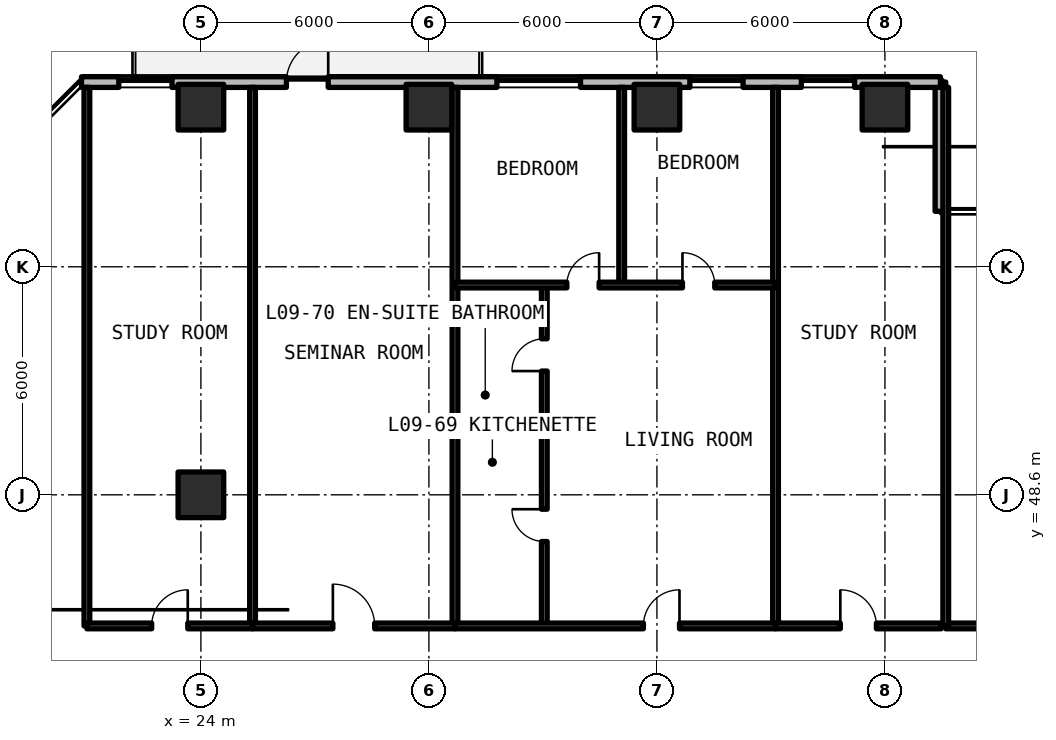
"""IFC4 building model, lengths in metres.
Left out: names, types, materials, properties, quantities, classifications, styles, units other than length and angle.
Written with IfcOpenShell. Run it as: python <this file> out.ifc"""

import sys

from ifc_helpers import new_model, si_unit, direction, frame, frame_2d, origin, origin_2d, place, context, subcontext, project, spatial, rectangle, extrude, element, fill, save


model = new_model("IFC4")
c1 = context("Model", 3, precision=1e-05, world=origin(), true_north=direction((0.0, 1.0)))
c2 = subcontext(c1, "Body", "Model", "MODEL_VIEW")
j1 = project(units=[si_unit("LENGTHUNIT", "METRE"), si_unit("PLANEANGLEUNIT", "RADIAN")], contexts=[c1])
p1 = place(None, origin())
s1 = spatial("IfcSite", under=j1, at=p1, CompositionType="ELEMENT")
p2 = place(p1, origin())
s2 = spatial("IfcBuilding", under=s1, at=p2, CompositionType="ELEMENT")
p3 = place(p2, frame((0.0, 0.0, 35.64)))
s3 = spatial("IfcBuildingStorey", under=s2, at=p3, CompositionType="ELEMENT", Elevation=35.64)
for number, where, z_axis, x_axis in (
    (1, (24.0, 48.6, 0.0), (0.0, 0.0, 1.0), (1.0, 0.0, 0.0)),
    (2, (24.0, 58.8, 0.0), (0.0, 0.0, 1.0), (1.0, 0.0, 0.0)),
    (3, (30.0, 58.8, 0.0), (0.0, 0.0, 1.0), (1.0, 0.0, 0.0)),
    (4, (36.0, 58.8, 0.0), (0.0, 0.0, 1.0), (1.0, 0.0, 0.0)),
    (5, (42.0, 58.8, 0.0), (0.0, 0.0, 1.0), (1.0, 0.0, 0.0)),
):
    element("IfcColumn", number, at=place(p3, frame(where, z_axis=z_axis, x_axis=x_axis)), inside=s3, PredefinedType="COLUMN", context=c2, shape_type="SweptSolid", body=[
        extrude(rectangle(XDim=1.2, YDim=1.2, at=origin_2d()), origin(), (0.0, 0.0, 1.0), 3.3),
    ])
p4 = place(p3, frame((43.46, 56.06, 0.0), z_axis=(0.0, 0.0, 1.0), x_axis=(0.0, 1.0, 0.0)))
e6 = element("IfcWall", 6, at=p4, inside=s3, PredefinedType="SOLIDWALL", context=c2, shape_type="SweptSolid", body=[
    extrude(rectangle(XDim=3.4, YDim=0.28, at=frame_2d((1.7, 0.0))), origin(), (0.0, 0.0, 1.0), 3.08),
])
p5 = place(p3, frame((43.46, 59.46, 0.0), z_axis=(0.0, 0.0, 1.0), x_axis=(-1.0, 0.0, 0.0)))
e7 = element("IfcWall", 7, at=p5, inside=s3, PredefinedType="SOLIDWALL", context=c2, shape_type="SweptSolid", body=[
    extrude(rectangle(XDim=22.602, YDim=0.28, at=frame_2d((11.301, 0.0))), origin(), (0.0, 0.0, 1.0), 3.08),
])
p6 = place(p5, frame((16.11, 0.0, 0.0)))
e8 = element("IfcOpeningElement", 8, at=p6, cuts=e7, PredefinedType="OPENING", context=c2, shape_type="SweptSolid", body=[
    extrude(rectangle(XDim=1.1, YDim=2.15, at=frame_2d((0.55, 1.075))), frame((0.0, 0.15, 0.0), z_axis=(0.0, -1.0, 0.0), x_axis=(1.0, 0.0, 0.0)), (0.0, 0.0, 1.0), 0.3),
])
p7 = place(p5, frame((20.221, 0.0, 0.78)))
e9 = element("IfcOpeningElement", 9, at=p7, cuts=e7, PredefinedType="OPENING", context=c2, shape_type="SweptSolid", body=[
    extrude(rectangle(XDim=1.4, YDim=1.65, at=frame_2d((0.7, 0.825))), frame((0.0, 0.15, 0.0), z_axis=(0.0, -1.0, 0.0), x_axis=(1.0, 0.0, 0.0)), (0.0, 0.0, 1.0), 0.3),
])
p8 = place(p5, frame((9.471, 0.0, 0.78)))
e10 = element("IfcOpeningElement", 10, at=p8, cuts=e7, PredefinedType="OPENING", context=c2, shape_type="SweptSolid", body=[
    extrude(rectangle(XDim=2.2, YDim=1.66, at=frame_2d((1.1, 0.83))), frame((0.0, 0.15, 0.0), z_axis=(0.0, -1.0, 0.0), x_axis=(1.0, 0.0, 0.0)), (0.0, 0.0, 1.0), 0.3),
])
p9 = place(p5, frame((5.193, 0.0, 0.78)))
e11 = element("IfcOpeningElement", 11, at=p9, cuts=e7, PredefinedType="OPENING", context=c2, shape_type="SweptSolid", body=[
    extrude(rectangle(XDim=1.4, YDim=1.65, at=frame_2d((0.7, 0.825))), frame((0.0, 0.15, 0.0), z_axis=(0.0, -1.0, 0.0), x_axis=(1.0, 0.0, 0.0)), (0.0, 0.0, 1.0), 0.3),
])
p10 = place(p5, frame((2.26, 0.0, 0.78)))
e12 = element("IfcOpeningElement", 12, at=p10, cuts=e7, PredefinedType="OPENING", context=c2, shape_type="SweptSolid", body=[
    extrude(rectangle(XDim=1.4, YDim=1.65, at=frame_2d((0.7, 0.825))), frame((0.0, 0.15, 0.0), z_axis=(0.0, -1.0, 0.0), x_axis=(1.0, 0.0, 0.0)), (0.0, 0.0, 1.0), 0.3),
])
p11 = place(p3, frame((43.6, 45.15, 0.0), z_axis=(0.0, 0.0, 1.0), x_axis=(1.0, 0.0, 0.0)))
e13 = element("IfcWall", 13, at=p11, inside=s3, PredefinedType="SOLIDWALL", context=c2, shape_type="SweptSolid", body=[
    extrude(rectangle(XDim=8.4, YDim=0.15, at=frame_2d((4.2, 0.0))), origin(), (0.0, 0.0, 1.0), 2.35),
])
p12 = place(p11, frame((3.65, 0.0, 0.0)))
e14 = element("IfcOpeningElement", 14, at=p12, cuts=e13, PredefinedType="OPENING", context=c2, shape_type="SweptSolid", body=[
    extrude(rectangle(XDim=1.1, YDim=2.15, at=frame_2d((0.55, 1.075))), frame((0.0, 0.085, 0.0), z_axis=(0.0, -1.0, 0.0), x_axis=(1.0, 0.0, 0.0)), (0.0, 0.0, 1.0), 0.17),
])
for number, where, z_axis, x_axis in (
    (15, (43.6, 45.15, 0.0), (0.0, 0.0, 1.0), (0.0, 1.0, 0.0)),
    (16, (21.0, 45.15, 0.0), (0.0, 0.0, 1.0), (0.0, 1.0, 0.0)),
    (17, (25.359, 45.15, 0.0), (0.0, 0.0, 1.0), (0.0, 1.0, 0.0)),
):
    element("IfcWall", number, at=place(p3, frame(where, z_axis=z_axis, x_axis=x_axis)), inside=s3, PredefinedType="SOLIDWALL", context=c2, shape_type="SweptSolid", body=[
        extrude(rectangle(XDim=14.17, YDim=0.15, at=frame_2d((7.085, 0.0))), origin(), (0.0, 0.0, 1.0), 2.35),
    ])
p13 = place(p3, frame((21.0, 45.15, 0.0), z_axis=(0.0, 0.0, 1.0), x_axis=(1.0, 0.0, 0.0)))
e18 = element("IfcWall", 18, at=p13, inside=s3, PredefinedType="SOLIDWALL", context=c2, shape_type="SweptSolid", body=[
    extrude(rectangle(XDim=4.359, YDim=0.15, at=frame_2d((2.179, 0.0))), origin(), (0.0, 0.0, 1.0), 2.35),
])
p14 = place(p13, frame((1.704, 0.0, 0.0)))
e19 = element("IfcOpeningElement", 19, at=p14, cuts=e18, PredefinedType="OPENING", context=c2, shape_type="SweptSolid", body=[
    extrude(rectangle(XDim=0.95, YDim=2.15, at=frame_2d((0.475, 1.075))), frame((0.0, 0.085, 0.0), z_axis=(0.0, -1.0, 0.0), x_axis=(1.0, 0.0, 0.0)), (0.0, 0.0, 1.0), 0.17),
])
p15 = place(p3, frame((30.686, 45.15, 0.0), z_axis=(0.0, 0.0, 1.0), x_axis=(0.0, 1.0, 0.0)))
e20 = element("IfcWall", 20, at=p15, inside=s3, PredefinedType="SOLIDWALL", context=c2, shape_type="SweptSolid", body=[
    extrude(rectangle(XDim=14.17, YDim=0.15, at=frame_2d((7.085, 0.0))), origin(), (0.0, 0.0, 1.0), 2.35),
])
p16 = place(p3, frame((25.359, 45.15, 0.0), z_axis=(0.0, 0.0, 1.0), x_axis=(1.0, 0.0, 0.0)))
e21 = element("IfcWall", 21, at=p16, inside=s3, PredefinedType="SOLIDWALL", context=c2, shape_type="SweptSolid", body=[
    extrude(rectangle(XDim=5.327, YDim=0.15, at=frame_2d((2.664, 0.0))), origin(), (0.0, 0.0, 1.0), 2.35),
])
p17 = place(p16, frame((2.114, 0.0, 0.0)))
e22 = element("IfcOpeningElement", 22, at=p17, cuts=e21, PredefinedType="OPENING", context=c2, shape_type="SweptSolid", body=[
    extrude(rectangle(XDim=1.1, YDim=2.15, at=frame_2d((0.55, 1.075))), frame((0.0, 0.085, 0.0), z_axis=(0.0, -1.0, 0.0), x_axis=(1.0, 0.0, 0.0)), (0.0, 0.0, 1.0), 0.17),
])
p18 = place(p3, frame((39.121, 45.15, 0.0), z_axis=(0.0, 0.0, 1.0), x_axis=(0.0, 1.0, 0.0)))
e23 = element("IfcWall", 23, at=p18, inside=s3, PredefinedType="SOLIDWALL", context=c2, shape_type="SweptSolid", body=[
    extrude(rectangle(XDim=14.17, YDim=0.15, at=frame_2d((7.085, 0.0))), origin(), (0.0, 0.0, 1.0), 2.35),
])
p19 = place(p3, frame((30.686, 50.442, 0.0), z_axis=(0.0, 0.0, 1.0), x_axis=(1.0, 0.0, 0.0)))
e24 = element("IfcWall", 24, at=p19, inside=s3, PredefinedType="PARTITIONING", context=c2, shape_type="SweptSolid", body=[
    extrude(rectangle(XDim=2.35, YDim=0.15, at=frame_2d((1.175, 0.0))), origin(), (0.0, 0.0, 1.0), 2.35),
])
p20 = place(p3, frame((33.036, 45.15, 0.0), z_axis=(0.0, 0.0, 1.0), x_axis=(0.0, 1.0, 0.0)))
e25 = element("IfcWall", 25, at=p20, inside=s3, PredefinedType="PARTITIONING", context=c2, shape_type="SweptSolid", body=[
    extrude(rectangle(XDim=8.97, YDim=0.15, at=frame_2d((4.485, 0.0))), origin(), (0.0, 0.0, 1.0), 2.35),
])
p21 = place(p20, frame((2.221, 0.0, 0.0)))
e26 = element("IfcOpeningElement", 26, at=p21, cuts=e25, PredefinedType="OPENING", context=c2, shape_type="SweptSolid", body=[
    extrude(rectangle(XDim=0.85, YDim=2.1, at=frame_2d((0.425, 1.05))), frame((0.0, 0.085, 0.0), z_axis=(0.0, -1.0, 0.0), x_axis=(1.0, 0.0, 0.0)), (0.0, 0.0, 1.0), 0.17),
])
p22 = place(p20, frame((6.706, 0.0, 0.0)))
e27 = element("IfcOpeningElement", 27, at=p22, cuts=e25, PredefinedType="OPENING", context=c2, shape_type="SweptSolid", body=[
    extrude(rectangle(XDim=0.85, YDim=2.1, at=frame_2d((0.425, 1.05))), frame((0.0, 0.085, 0.0), z_axis=(0.0, -1.0, 0.0), x_axis=(1.0, 0.0, 0.0)), (0.0, 0.0, 1.0), 0.17),
])
p23 = place(p3, frame((35.073, 54.12, 0.0), z_axis=(0.0, 0.0, 1.0), x_axis=(0.0, 1.0, 0.0)))
e28 = element("IfcWall", 28, at=p23, inside=s3, PredefinedType="PARTITIONING", context=c2, shape_type="SweptSolid", body=[
    extrude(rectangle(XDim=5.2, YDim=0.15, at=frame_2d((2.6, 0.0))), origin(), (0.0, 0.0, 1.0), 2.35),
])
p24 = place(p3, frame((30.686, 54.12, 0.0), z_axis=(0.0, 0.0, 1.0), x_axis=(1.0, 0.0, 0.0)))
e29 = element("IfcWall", 29, at=p24, inside=s3, PredefinedType="PARTITIONING", context=c2, shape_type="SweptSolid", body=[
    extrude(rectangle(XDim=8.435, YDim=0.15, at=frame_2d((4.217, 0.0))), origin(), (0.0, 0.0, 1.0), 2.35),
])
p25 = place(p24, frame((2.943, 0.0, 0.0)))
e30 = element("IfcOpeningElement", 30, at=p25, cuts=e29, PredefinedType="OPENING", context=c2, shape_type="SweptSolid", body=[
    extrude(rectangle(XDim=0.85, YDim=2.1, at=frame_2d((0.425, 1.05))), frame((0.0, 0.085, 0.0), z_axis=(0.0, -1.0, 0.0), x_axis=(1.0, 0.0, 0.0)), (0.0, 0.0, 1.0), 0.17),
])
p26 = place(p24, frame((5.986, 0.0, 0.0)))
e31 = element("IfcOpeningElement", 31, at=p26, cuts=e29, PredefinedType="OPENING", context=c2, shape_type="SweptSolid", body=[
    extrude(rectangle(XDim=0.85, YDim=2.1, at=frame_2d((0.425, 1.05))), frame((0.0, 0.085, 0.0), z_axis=(0.0, -1.0, 0.0), x_axis=(1.0, 0.0, 0.0)), (0.0, 0.0, 1.0), 0.17),
])
p27 = place(p3, frame((30.686, 45.15, 0.0), z_axis=(0.0, 0.0, 1.0), x_axis=(1.0, 0.0, 0.0)))
e32 = element("IfcWall", 32, at=p27, inside=s3, PredefinedType="SOLIDWALL", context=c2, shape_type="SweptSolid", body=[
    extrude(rectangle(XDim=8.435, YDim=0.15, at=frame_2d((4.217, 0.0))), origin(), (0.0, 0.0, 1.0), 2.35),
])
p28 = place(p27, frame((4.958, 0.0, 0.0)))
e33 = element("IfcOpeningElement", 33, at=p28, cuts=e32, PredefinedType="OPENING", context=c2, shape_type="SweptSolid", body=[
    extrude(rectangle(XDim=0.95, YDim=2.15, at=frame_2d((0.475, 1.075))), frame((0.0, 0.085, 0.0), z_axis=(0.0, -1.0, 0.0), x_axis=(1.0, 0.0, 0.0)), (0.0, 0.0, 1.0), 0.17),
])
p29 = place(p3, frame((39.121, 45.15, 0.0), z_axis=(0.0, 0.0, 1.0), x_axis=(1.0, 0.0, 0.0)))
e34 = element("IfcWall", 34, at=p29, inside=s3, PredefinedType="SOLIDWALL", context=c2, shape_type="SweptSolid", body=[
    extrude(rectangle(XDim=4.359, YDim=0.15, at=frame_2d((2.179, 0.0))), origin(), (0.0, 0.0, 1.0), 2.35),
])
p30 = place(p29, frame((1.704, 0.0, 0.0)))
e35 = element("IfcOpeningElement", 35, at=p30, cuts=e34, PredefinedType="OPENING", context=c2, shape_type="SweptSolid", body=[
    extrude(rectangle(XDim=0.95, YDim=2.15, at=frame_2d((0.475, 1.075))), frame((0.0, 0.085, 0.0), z_axis=(0.0, -1.0, 0.0), x_axis=(1.0, 0.0, 0.0)), (0.0, 0.0, 1.0), 0.17),
])
p31 = place(p6, frame((1.1, 0.0, 0.0), z_axis=(0.0, 0.0, 1.0), x_axis=(-1.0, 0.0, 0.0)))
e36 = element("IfcDoor", 36, at=p31, inside=s3, OperationType="SINGLE_SWING_RIGHT", PredefinedType="DOOR", context=c2, shape_type="SweptSolid", body=[
    extrude(rectangle(XDim=1.1, YDim=2.15, at=frame_2d((0.55, 1.075))), frame((0.0, 0.025, 0.0), z_axis=(0.0, -1.0, 0.0), x_axis=(1.0, 0.0, 0.0)), (0.0, 0.0, 1.0), 0.05),
])
fill(e8, e36)
p32 = place(p7, origin())
e37 = element("IfcWindow", 37, at=p32, inside=s3, PartitioningType="SINGLE_PANEL", PredefinedType="WINDOW", context=c2, shape_type="SweptSolid", body=[
    extrude(rectangle(XDim=1.4, YDim=1.65, at=frame_2d((0.7, 0.825))), frame((0.0, 0.03, 0.0), z_axis=(0.0, -1.0, 0.0), x_axis=(1.0, 0.0, 0.0)), (0.0, 0.0, 1.0), 0.06),
])
fill(e9, e37)
p33 = place(p8, origin())
e38 = element("IfcWindow", 38, at=p33, inside=s3, PartitioningType="SINGLE_PANEL", PredefinedType="WINDOW", context=c2, shape_type="SweptSolid", body=[
    extrude(rectangle(XDim=2.2, YDim=1.66, at=frame_2d((1.1, 0.83))), frame((0.0, 0.03, 0.0), z_axis=(0.0, -1.0, 0.0), x_axis=(1.0, 0.0, 0.0)), (0.0, 0.0, 1.0), 0.06),
])
fill(e10, e38)
p34 = place(p9, origin())
e39 = element("IfcWindow", 39, at=p34, inside=s3, PartitioningType="SINGLE_PANEL", PredefinedType="WINDOW", context=c2, shape_type="SweptSolid", body=[
    extrude(rectangle(XDim=1.4, YDim=1.65, at=frame_2d((0.7, 0.825))), frame((0.0, 0.03, 0.0), z_axis=(0.0, -1.0, 0.0), x_axis=(1.0, 0.0, 0.0)), (0.0, 0.0, 1.0), 0.06),
])
fill(e11, e39)
p35 = place(p10, origin())
e40 = element("IfcWindow", 40, at=p35, inside=s3, PartitioningType="SINGLE_PANEL", PredefinedType="WINDOW", context=c2, shape_type="SweptSolid", body=[
    extrude(rectangle(XDim=1.4, YDim=1.65, at=frame_2d((0.7, 0.825))), frame((0.0, 0.03, 0.0), z_axis=(0.0, -1.0, 0.0), x_axis=(1.0, 0.0, 0.0)), (0.0, 0.0, 1.0), 0.06),
])
fill(e12, e40)
p36 = place(p14, origin())
e41 = element("IfcDoor", 41, at=p36, inside=s3, OperationType="SINGLE_SWING_RIGHT", PredefinedType="DOOR", context=c2, shape_type="SweptSolid", body=[
    extrude(rectangle(XDim=0.95, YDim=2.15, at=frame_2d((0.475, 1.075))), frame((0.0, 0.025, 0.0), z_axis=(0.0, -1.0, 0.0), x_axis=(1.0, 0.0, 0.0)), (0.0, 0.0, 1.0), 0.05),
])
fill(e19, e41)
p37 = place(p17, origin())
e42 = element("IfcDoor", 42, at=p37, inside=s3, OperationType="SINGLE_SWING_LEFT", PredefinedType="DOOR", context=c2, shape_type="SweptSolid", body=[
    extrude(rectangle(XDim=1.1, YDim=2.15, at=frame_2d((0.55, 1.075))), frame((0.0, 0.025, 0.0), z_axis=(0.0, -1.0, 0.0), x_axis=(1.0, 0.0, 0.0)), (0.0, 0.0, 1.0), 0.05),
])
fill(e22, e42)
p38 = place(p21, origin())
e43 = element("IfcDoor", 43, at=p38, inside=s3, OperationType="SINGLE_SWING_RIGHT", PredefinedType="DOOR", context=c2, shape_type="SweptSolid", body=[
    extrude(rectangle(XDim=0.85, YDim=2.1, at=frame_2d((0.425, 1.05))), frame((0.0, 0.025, 0.0), z_axis=(0.0, -1.0, 0.0), x_axis=(1.0, 0.0, 0.0)), (0.0, 0.0, 1.0), 0.05),
])
fill(e26, e43)
p39 = place(p22, origin())
e44 = element("IfcDoor", 44, at=p39, inside=s3, OperationType="SINGLE_SWING_LEFT", PredefinedType="DOOR", context=c2, shape_type="SweptSolid", body=[
    extrude(rectangle(XDim=0.85, YDim=2.1, at=frame_2d((0.425, 1.05))), frame((0.0, 0.025, 0.0), z_axis=(0.0, -1.0, 0.0), x_axis=(1.0, 0.0, 0.0)), (0.0, 0.0, 1.0), 0.05),
])
fill(e27, e44)
p40 = place(p25, origin())
e45 = element("IfcDoor", 45, at=p40, inside=s3, OperationType="SINGLE_SWING_RIGHT", PredefinedType="DOOR", context=c2, shape_type="SweptSolid", body=[
    extrude(rectangle(XDim=0.85, YDim=2.1, at=frame_2d((0.425, 1.05))), frame((0.0, 0.025, 0.0), z_axis=(0.0, -1.0, 0.0), x_axis=(1.0, 0.0, 0.0)), (0.0, 0.0, 1.0), 0.05),
])
fill(e30, e45)
p41 = place(p26, origin())
e46 = element("IfcDoor", 46, at=p41, inside=s3, OperationType="SINGLE_SWING_LEFT", PredefinedType="DOOR", context=c2, shape_type="SweptSolid", body=[
    extrude(rectangle(XDim=0.85, YDim=2.1, at=frame_2d((0.425, 1.05))), frame((0.0, 0.025, 0.0), z_axis=(0.0, -1.0, 0.0), x_axis=(1.0, 0.0, 0.0)), (0.0, 0.0, 1.0), 0.05),
])
fill(e31, e46)
p42 = place(p28, origin())
e47 = element("IfcDoor", 47, at=p42, inside=s3, OperationType="SINGLE_SWING_RIGHT", PredefinedType="DOOR", context=c2, shape_type="SweptSolid", body=[
    extrude(rectangle(XDim=0.95, YDim=2.15, at=frame_2d((0.475, 1.075))), frame((0.0, 0.025, 0.0), z_axis=(0.0, -1.0, 0.0), x_axis=(1.0, 0.0, 0.0)), (0.0, 0.0, 1.0), 0.05),
])
fill(e33, e47)
p43 = place(p30, origin())
e48 = element("IfcDoor", 48, at=p43, inside=s3, OperationType="SINGLE_SWING_LEFT", PredefinedType="DOOR", context=c2, shape_type="SweptSolid", body=[
    extrude(rectangle(XDim=0.95, YDim=2.15, at=frame_2d((0.475, 1.075))), frame((0.0, 0.025, 0.0), z_axis=(0.0, -1.0, 0.0), x_axis=(1.0, 0.0, 0.0)), (0.0, 0.0, 1.0), 0.05),
])
fill(e35, e48)
save(model, sys.argv[1])
